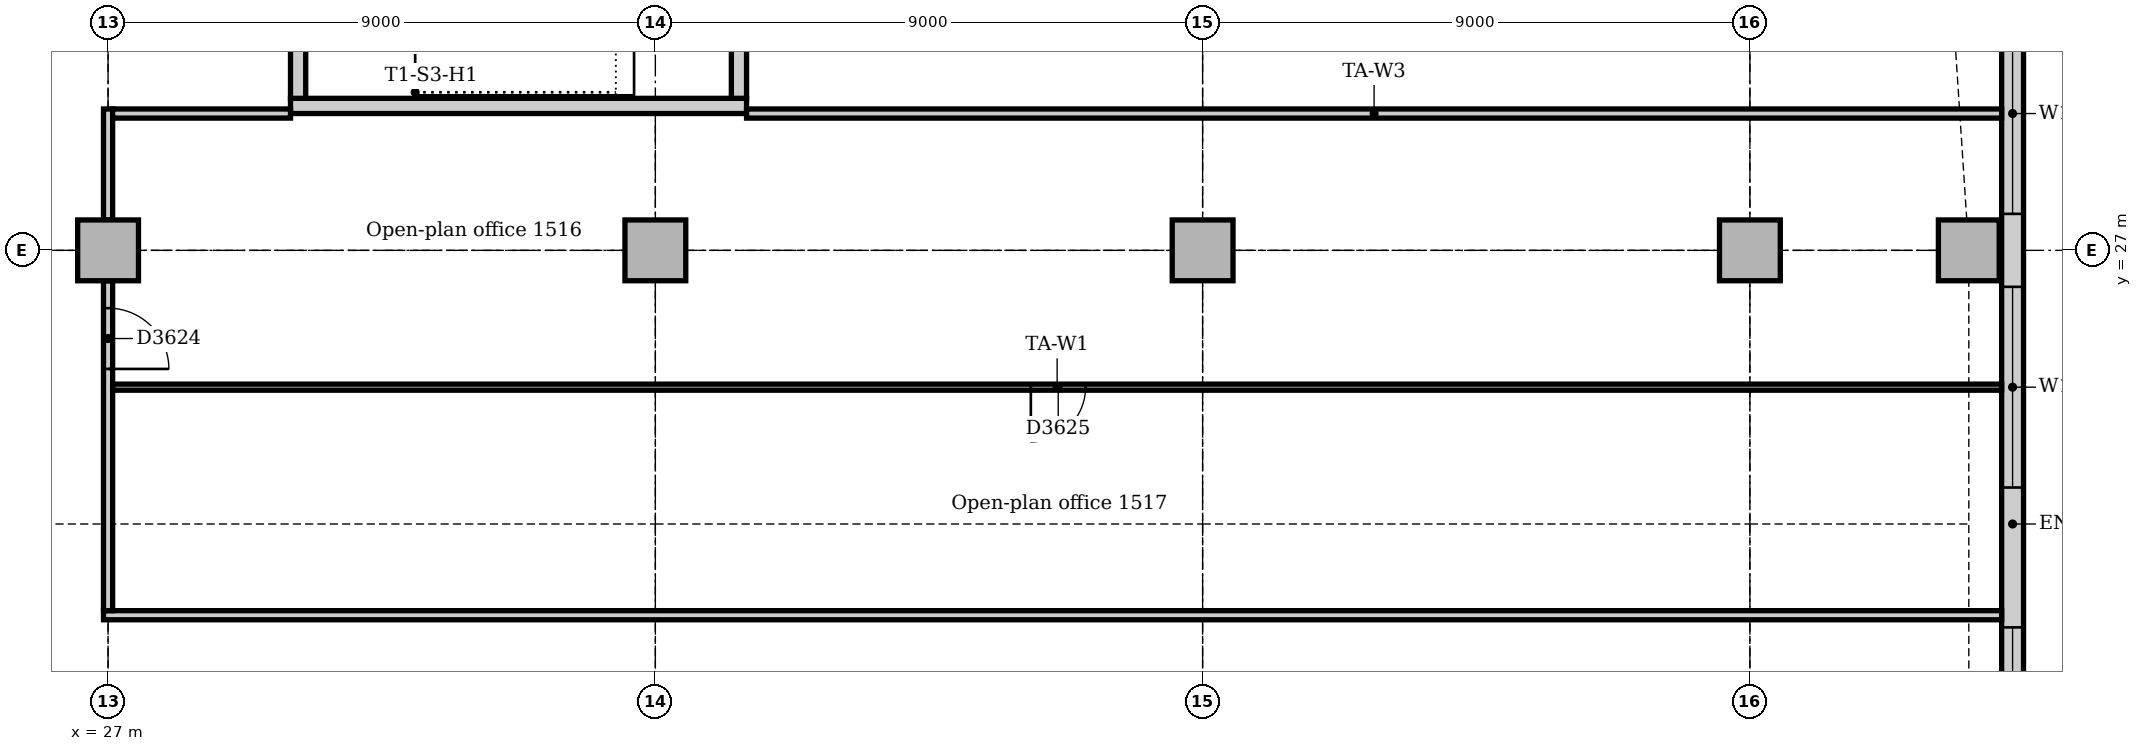
"""IFC4 building model, lengths in metres.
Left out: names, types, materials, properties, quantities, classifications, styles, units other than length and angle.
Written with IfcOpenShell. Run it as: python <this file> out.ifc"""

import sys

from ifc_helpers import new_model, si_unit, direction, frame, frame_2d, origin, origin_2d, place, context, subcontext, project, spatial, rectangle, extrude, element, fill, save


model = new_model("IFC4")
c1 = context("Model", 3, precision=1e-05, world=origin(), true_north=direction((0.0, 1.0)))
c2 = subcontext(c1, "Body", "Model", "MODEL_VIEW")
j1 = project(units=[si_unit("LENGTHUNIT", "METRE"), si_unit("PLANEANGLEUNIT", "RADIAN")], contexts=[c1])
p1 = place(None, origin())
s1 = spatial("IfcSite", under=j1, at=p1, CompositionType="ELEMENT")
p2 = place(p1, origin())
s2 = spatial("IfcBuilding", under=s1, at=p2, CompositionType="ELEMENT")
p3 = place(p2, frame((0.0, 0.0, 67.0)))
s3 = spatial("IfcBuildingStorey", under=s2, at=p3, CompositionType="ELEMENT", Elevation=67.0)
p4 = place(p3, frame((30.0, 29.375, 0.0), z_axis=(0.0, 0.0, 1.0), x_axis=(1.0, 0.0, 0.0)))
e1 = element("IfcWall", 1, at=p4, inside=s3, PredefinedType="SOLIDWALL", context=c2, shape_type="SweptSolid", body=[
    extrude(rectangle(XDim=7.5, YDim=0.25, at=frame_2d((3.75, 0.0))), origin(), (0.0, 0.0, 1.0), 4.0),
])
p5 = place(p3, frame((37.375, 29.5, 0.0), z_axis=(0.0, 0.0, 1.0), x_axis=(0.0, 1.0, 0.0)))
e2 = element("IfcWall", 2, at=p5, inside=s3, PredefinedType="SOLIDWALL", context=c2, shape_type="SweptSolid", body=[
    extrude(rectangle(XDim=4.0, YDim=0.25, at=frame_2d((2.0, 0.0))), origin(), (0.0, 0.0, 1.0), 4.0),
])
p6 = place(p3, frame((30.125, 33.5, 0.0), z_axis=(0.0, 0.0, 1.0), x_axis=(0.0, -1.0, 0.0)))
e3 = element("IfcWall", 3, at=p6, inside=s3, PredefinedType="SOLIDWALL", context=c2, shape_type="SweptSolid", body=[
    extrude(rectangle(XDim=4.0, YDim=0.25, at=frame_2d((2.0, 0.0))), origin(), (0.0, 0.0, 1.0), 4.0),
])
p7 = place(p6, frame((1.5, 0.0, 0.0)))
e4 = element("IfcOpeningElement", 4, at=p7, cuts=e3, PredefinedType="OPENING", context=c2, shape_type="SweptSolid", body=[
    extrude(rectangle(XDim=1.0, YDim=2.1, at=frame_2d((0.5, 1.05))), frame((0.0, 0.135, 0.0), z_axis=(0.0, -1.0, 0.0), x_axis=(1.0, 0.0, 0.0)), (0.0, 0.0, 1.0), 0.27),
])
for number, where, z_axis, x_axis in (
    (5, (57.6, 27.0, 0.0), (0.0, 0.0, 1.0), (1.0, 0.0, 0.0)),
    (6, (27.0, 27.0, 0.0), (0.0, 0.0, 1.0), (1.0, 0.0, 0.0)),
    (7, (36.0, 27.0, 0.0), (0.0, 0.0, 1.0), (1.0, 0.0, 0.0)),
    (8, (45.0, 27.0, 0.0), (0.0, 0.0, 1.0), (1.0, 0.0, 0.0)),
    (9, (54.0, 27.0, 0.0), (0.0, 0.0, 1.0), (1.0, 0.0, 0.0)),
):
    element("IfcColumn", number, at=place(p3, frame(where, z_axis=z_axis, x_axis=x_axis)), inside=s3, PredefinedType="COLUMN", context=c2, shape_type="SweptSolid", body=[
        extrude(rectangle(XDim=1.0, YDim=1.0, at=origin_2d()), origin(), (0.0, 0.0, 1.0), 3.85),
    ])
p8 = place(p3, frame((58.32, 10.243, 0.0), z_axis=(0.0, 0.0, 1.0), x_axis=(0.0, 1.0, 0.0)))
e10 = element("IfcWall", 10, at=p8, inside=s3, PredefinedType="STANDARD", context=c2, shape_type="SweptSolid", body=[
    extrude(rectangle(XDim=24.515, YDim=0.36, at=frame_2d((12.257, 0.0))), origin(), (0.0, 0.0, 1.0), 3.85),
])
p9 = place(p8, frame((3.857, 0.0, 0.9)))
e11 = element("IfcOpeningElement", 11, at=p9, cuts=e10, PredefinedType="OPENING", context=c2, shape_type="SweptSolid", body=[
    extrude(rectangle(XDim=3.3, YDim=1.6, at=frame_2d((1.65, 0.8))), frame((0.0, 0.19, 0.0), z_axis=(0.0, -1.0, 0.0), x_axis=(1.0, 0.0, 0.0)), (0.0, 0.0, 1.0), 0.38),
])
p10 = place(p8, frame((8.757, 0.0, 0.9)))
e12 = element("IfcOpeningElement", 12, at=p10, cuts=e10, PredefinedType="OPENING", context=c2, shape_type="SweptSolid", body=[
    extrude(rectangle(XDim=1.8, YDim=1.6, at=frame_2d((0.9, 0.8))), frame((0.0, 0.19, 0.0), z_axis=(0.0, -1.0, 0.0), x_axis=(1.0, 0.0, 0.0)), (0.0, 0.0, 1.0), 0.38),
])
p11 = place(p8, frame((12.857, 0.0, 0.9)))
e13 = element("IfcOpeningElement", 13, at=p11, cuts=e10, PredefinedType="OPENING", context=c2, shape_type="SweptSolid", body=[
    extrude(rectangle(XDim=3.3, YDim=1.6, at=frame_2d((1.65, 0.8))), frame((0.0, 0.19, 0.0), z_axis=(0.0, -1.0, 0.0), x_axis=(1.0, 0.0, 0.0)), (0.0, 0.0, 1.0), 0.38),
])
p12 = place(p8, frame((17.357, 0.0, 0.9)))
e14 = element("IfcOpeningElement", 14, at=p12, cuts=e10, PredefinedType="OPENING", context=c2, shape_type="SweptSolid", body=[
    extrude(rectangle(XDim=3.3, YDim=1.6, at=frame_2d((1.65, 0.8))), frame((0.0, 0.19, 0.0), z_axis=(0.0, -1.0, 0.0), x_axis=(1.0, 0.0, 0.0)), (0.0, 0.0, 1.0), 0.38),
])
p13 = place(p3, frame((26.925, 21.0, 0.0), z_axis=(0.0, 0.0, 1.0), x_axis=(1.0, 0.0, 0.0)))
e15 = element("IfcWall", 15, at=p13, inside=s3, PredefinedType="PARTITIONING", context=c2, shape_type="SweptSolid", body=[
    extrude(rectangle(XDim=31.215, YDim=0.15, at=frame_2d((15.607, 0.0))), origin(), (0.0, 0.0, 1.0), 3.85),
])
p14 = place(p3, frame((27.0, 21.075, 0.0), z_axis=(0.0, 0.0, 1.0), x_axis=(0.0, 1.0, 0.0)))
e16 = element("IfcWall", 16, at=p14, inside=s3, PredefinedType="PARTITIONING", context=c2, shape_type="SweptSolid", body=[
    extrude(rectangle(XDim=5.425, YDim=0.15, at=frame_2d((2.712, 0.0))), origin(), (0.0, 0.0, 1.0), 3.158),
])
p15 = place(p14, frame((3.975, 0.0, 0.0)))
e17 = element("IfcOpeningElement", 17, at=p15, cuts=e16, PredefinedType="OPENING", context=c2, shape_type="SweptSolid", body=[
    extrude(rectangle(XDim=1.0, YDim=2.1, at=frame_2d((0.5, 1.05))), frame((0.0, 0.085, 0.0), z_axis=(0.0, -1.0, 0.0), x_axis=(1.0, 0.0, 0.0)), (0.0, 0.0, 1.0), 0.17),
])
p16 = place(p3, frame((27.0, 27.5, 0.0), z_axis=(0.0, 0.0, 1.0), x_axis=(0.0, 1.0, 0.0)))
e18 = element("IfcWall", 18, at=p16, inside=s3, PredefinedType="PARTITIONING", context=c2, shape_type="SweptSolid", body=[
    extrude(rectangle(XDim=1.825, YDim=0.15, at=frame_2d((0.912, 0.0))), origin(), (0.0, 0.0, 1.0), 3.158),
])
p17 = place(p3, frame((27.075, 29.25, 0.0), z_axis=(0.0, 0.0, 1.0), x_axis=(1.0, 0.0, 0.0)))
e19 = element("IfcWall", 19, at=p17, inside=s3, PredefinedType="PARTITIONING", context=c2, shape_type="SweptSolid", body=[
    extrude(rectangle(XDim=2.925, YDim=0.15, at=frame_2d((1.462, 0.0))), origin(), (0.0, 0.0, 1.0), 3.85),
])
p18 = place(p3, frame((37.5, 29.25, 0.0), z_axis=(0.0, 0.0, 1.0), x_axis=(1.0, 0.0, 0.0)))
e20 = element("IfcWall", 20, at=p18, inside=s3, PredefinedType="PARTITIONING", context=c2, shape_type="SweptSolid", body=[
    extrude(rectangle(XDim=20.64, YDim=0.15, at=frame_2d((10.32, 0.0))), origin(), (0.0, 0.0, 1.0), 3.85),
])
p19 = place(p3, frame((27.075, 24.75, 0.0), z_axis=(0.0, 0.0, 1.0), x_axis=(1.0, 0.0, 0.0)))
e21 = element("IfcWall", 21, at=p19, inside=s3, PredefinedType="PARTITIONING", context=c2, shape_type="SweptSolid", body=[
    extrude(rectangle(XDim=31.065, YDim=0.1, at=frame_2d((15.533, 0.0))), origin(), (0.0, 0.0, 1.0), 3.85),
])
p20 = place(p19, frame((15.1, 0.0, 0.0)))
e22 = element("IfcOpeningElement", 22, at=p20, cuts=e21, PredefinedType="OPENING", context=c2, shape_type="SweptSolid", body=[
    extrude(rectangle(XDim=0.9, YDim=2.1, at=frame_2d((0.45, 1.05))), frame((0.0, 0.06, 0.0), z_axis=(0.0, -1.0, 0.0), x_axis=(1.0, 0.0, 0.0)), (0.0, 0.0, 1.0), 0.12),
])
p21 = place(p10, origin())
e23 = element("IfcWindow", 23, at=p21, inside=s3, PartitioningType="SINGLE_PANEL", PredefinedType="WINDOW", context=c2, shape_type="SweptSolid", body=[
    extrude(rectangle(XDim=1.8, YDim=1.6, at=frame_2d((0.9, 0.8))), frame((0.0, 0.13, 0.0), z_axis=(0.0, -1.0, 0.0), x_axis=(1.0, 0.0, 0.0)), (0.0, 0.0, 1.0), 0.06),
])
fill(e12, e23)
p22 = place(p11, origin())
e24 = element("IfcWindow", 24, at=p22, inside=s3, PartitioningType="SINGLE_PANEL", PredefinedType="WINDOW", context=c2, shape_type="SweptSolid", body=[
    extrude(rectangle(XDim=3.3, YDim=1.6, at=frame_2d((1.65, 0.8))), frame((0.0, 0.13, 0.0), z_axis=(0.0, -1.0, 0.0), x_axis=(1.0, 0.0, 0.0)), (0.0, 0.0, 1.0), 0.06),
])
fill(e13, e24)
p23 = place(p12, origin())
e25 = element("IfcWindow", 25, at=p23, inside=s3, PartitioningType="SINGLE_PANEL", PredefinedType="WINDOW", context=c2, shape_type="SweptSolid", body=[
    extrude(rectangle(XDim=3.3, YDim=1.6, at=frame_2d((1.65, 0.8))), frame((0.0, 0.13, 0.0), z_axis=(0.0, -1.0, 0.0), x_axis=(1.0, 0.0, 0.0)), (0.0, 0.0, 1.0), 0.06),
])
fill(e14, e25)
p24 = place(p15, frame((1.0, 0.0, 0.0), z_axis=(0.0, 0.0, 1.0), x_axis=(-1.0, 0.0, 0.0)))
e26 = element("IfcDoor", 26, at=p24, inside=s3, OperationType="SINGLE_SWING_RIGHT", PredefinedType="DOOR", context=c2, shape_type="SweptSolid", body=[
    extrude(rectangle(XDim=1.0, YDim=2.1, at=frame_2d((0.5, 1.05))), frame((0.0, 0.025, 0.0), z_axis=(0.0, -1.0, 0.0), x_axis=(1.0, 0.0, 0.0)), (0.0, 0.0, 1.0), 0.05),
])
fill(e17, e26)
p25 = place(p20, frame((0.9, 0.0, 0.0), z_axis=(0.0, 0.0, 1.0), x_axis=(-1.0, 0.0, 0.0)))
e27 = element("IfcDoor", 27, at=p25, inside=s3, OperationType="SINGLE_SWING_RIGHT", PredefinedType="DOOR", context=c2, shape_type="SweptSolid", body=[
    extrude(rectangle(XDim=0.9, YDim=2.1, at=frame_2d((0.45, 1.05))), frame((0.0, 0.025, 0.0), z_axis=(0.0, -1.0, 0.0), x_axis=(1.0, 0.0, 0.0)), (0.0, 0.0, 1.0), 0.05),
])
fill(e22, e27)
save(model, sys.argv[1])
